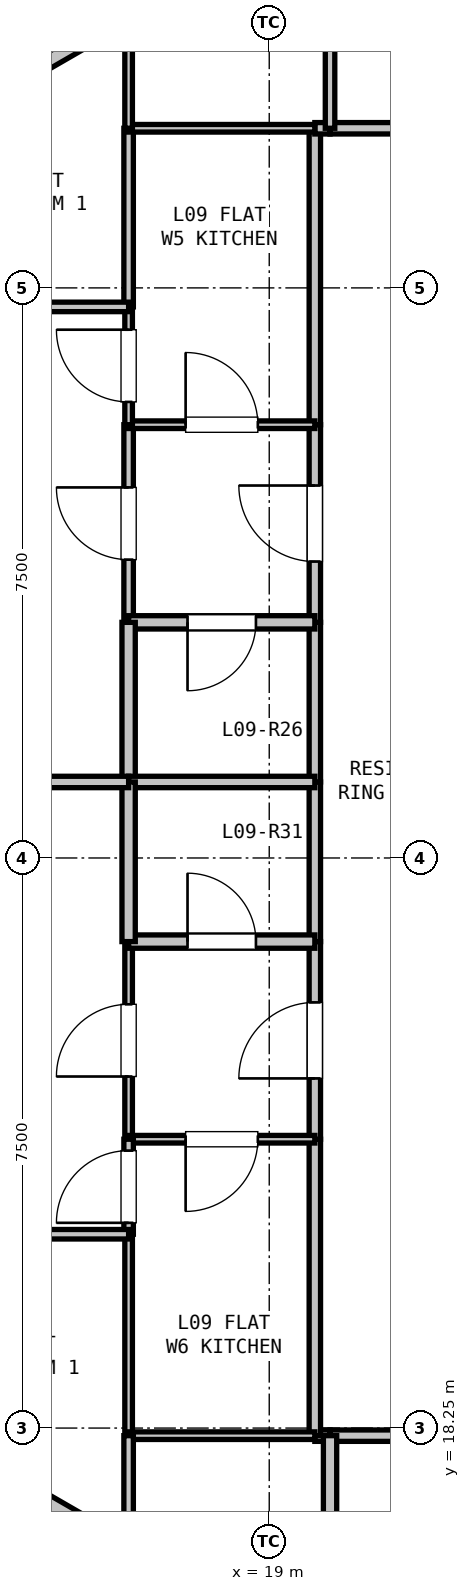
"""IFC4 building model, lengths in metres.
Left out: names, types, materials, properties, quantities, classifications, styles, units other than length and angle.
Written with IfcOpenShell. Run it as: python <this file> out.ifc"""

import sys

from ifc_helpers import new_model, si_unit, direction, frame, frame_2d, origin, place, context, subcontext, project, spatial, rectangle, extrude, element, fill, save


model = new_model("IFC4")
c1 = context("Model", 3, precision=1e-05, world=origin(), true_north=direction((0.0, 1.0)))
c2 = subcontext(c1, "Body", "Model", "MODEL_VIEW")
j1 = project(units=[si_unit("LENGTHUNIT", "METRE"), si_unit("PLANEANGLEUNIT", "RADIAN")], contexts=[c1])
p1 = place(None, origin())
s1 = spatial("IfcSite", under=j1, at=p1, CompositionType="ELEMENT")
p2 = place(p1, origin())
s2 = spatial("IfcBuilding", under=s1, at=p2, CompositionType="ELEMENT")
p3 = place(p2, frame((0.0, 0.0, 35.7)))
s3 = spatial("IfcBuildingStorey", under=s2, at=p3, CompositionType="ELEMENT", Elevation=35.7)
for number, where, z_axis, x_axis in (
    (1, (15.008, 35.611, 0.0), (0.0, 0.0, 1.0), (0.866, 0.5, 0.0)),
    (2, (16.48, 17.039, 0.0), (0.0, 0.0, 1.0), (-0.866, 0.5, 0.0)),
):
    element("IfcWall", number, at=place(p3, frame(where, z_axis=z_axis, x_axis=x_axis)), inside=s3, PredefinedType="PARAPET", context=c2, shape_type="SweptSolid", body=[
        extrude(rectangle(XDim=1.7, YDim=0.2, at=frame_2d((0.85, 0.0))), origin(), (0.0, 0.0, 1.0), 2.66),
    ])
p4 = place(p3, frame((21.8, 18.15, 0.0), z_axis=(0.0, 0.0, 1.0), x_axis=(-1.0, 0.0, 0.0)))
e3 = element("IfcWall", 3, at=p4, inside=s3, PredefinedType="PARTITIONING", context=c2, shape_type="SweptSolid", body=[
    extrude(rectangle(XDim=2.0, YDim=0.15, at=frame_2d((1.0, 0.0))), origin(), (0.0, 0.0, 1.0), 3.04),
])
p5 = place(p3, frame((19.8, 18.15, 0.0), z_axis=(0.0, 0.0, 1.0), x_axis=(-1.0, 0.0, 0.0)))
e4 = element("IfcWall", 4, at=p5, inside=s3, PredefinedType="PARTITIONING", context=c2, shape_type="SweptSolid", body=[
    extrude(rectangle(XDim=0.2, YDim=0.15, at=frame_2d((0.1, 0.0))), origin(), (0.0, 0.0, 1.0), 3.04),
])
p6 = place(p3, frame((19.6, 18.15, 0.0), z_axis=(0.0, 0.0, 1.0), x_axis=(0.0, 1.0, 0.0)))
e5 = element("IfcWall", 5, at=p6, inside=s3, PredefinedType="PARTITIONING", context=c2, shape_type="SweptSolid", body=[
    extrude(rectangle(XDim=3.9, YDim=0.15, at=frame_2d((1.95, 0.0))), origin(), (0.0, 0.0, 1.0), 2.338),
])
p7 = place(p3, frame((19.6, 22.05, 0.0), z_axis=(0.0, 0.0, 1.0), x_axis=(0.0, 1.0, 0.0)))
e6 = element("IfcWall", 6, at=p7, inside=s3, PredefinedType="PARTITIONING", context=c2, shape_type="SweptSolid", body=[
    extrude(rectangle(XDim=2.6, YDim=0.15, at=frame_2d((1.3, 0.0))), origin(), (0.0, 0.0, 1.0), 3.04),
])
p8 = place(p7, frame((0.8, 0.0, 0.0)))
e7 = element("IfcOpeningElement", 7, at=p8, cuts=e6, PredefinedType="OPENING", context=c2, shape_type="SweptSolid", body=[
    extrude(rectangle(XDim=1.0, YDim=2.15, at=frame_2d((0.5, 1.075))), frame((0.0, 0.085, 0.0), z_axis=(0.0, -1.0, 0.0), x_axis=(1.0, 0.0, 0.0)), (0.0, 0.0, 1.0), 0.17),
])
for number, where, z_axis, x_axis in (
    (8, (19.6, 24.65, 0.0), (0.0, 0.0, 1.0), (0.0, 1.0, 0.0)),
    (9, (19.6, 26.75, 0.0), (0.0, 0.0, 1.0), (0.0, 1.0, 0.0)),
):
    element("IfcWall", number, at=place(p3, frame(where, z_axis=z_axis, x_axis=x_axis)), inside=s3, PredefinedType="PARTITIONING", context=c2, shape_type="SweptSolid", body=[
        extrude(rectangle(XDim=2.1, YDim=0.15, at=frame_2d((1.05, 0.0))), origin(), (0.0, 0.0, 1.0), 3.04),
    ])
p9 = place(p3, frame((19.6, 28.85, 0.0), z_axis=(0.0, 0.0, 1.0), x_axis=(0.0, 1.0, 0.0)))
e10 = element("IfcWall", 10, at=p9, inside=s3, PredefinedType="PARTITIONING", context=c2, shape_type="SweptSolid", body=[
    extrude(rectangle(XDim=2.6, YDim=0.15, at=frame_2d((1.3, 0.0))), origin(), (0.0, 0.0, 1.0), 3.04),
])
p10 = place(p9, frame((0.8, 0.0, 0.0)))
e11 = element("IfcOpeningElement", 11, at=p10, cuts=e10, PredefinedType="OPENING", context=c2, shape_type="SweptSolid", body=[
    extrude(rectangle(XDim=1.0, YDim=2.15, at=frame_2d((0.5, 1.075))), frame((0.0, 0.085, 0.0), z_axis=(0.0, -1.0, 0.0), x_axis=(1.0, 0.0, 0.0)), (0.0, 0.0, 1.0), 0.17),
])
p11 = place(p3, frame((19.6, 31.45, 0.0), z_axis=(0.0, 0.0, 1.0), x_axis=(0.0, 1.0, 0.0)))
e12 = element("IfcWall", 12, at=p11, inside=s3, PredefinedType="PARTITIONING", context=c2, shape_type="SweptSolid", body=[
    extrude(rectangle(XDim=3.9, YDim=0.15, at=frame_2d((1.95, 0.0))), origin(), (0.0, 0.0, 1.0), 2.338),
])
p12 = place(p3, frame((19.6, 35.35, 0.0), z_axis=(0.0, 0.0, 1.0), x_axis=(1.0, 0.0, 0.0)))
e13 = element("IfcWall", 13, at=p12, inside=s3, PredefinedType="PARTITIONING", context=c2, shape_type="SweptSolid", body=[
    extrude(rectangle(XDim=0.2, YDim=0.15, at=frame_2d((0.1, 0.0))), origin(), (0.0, 0.0, 1.0), 3.04),
])
p13 = place(p3, frame((19.8, 35.35, 0.0), z_axis=(0.0, 0.0, 1.0), x_axis=(1.0, 0.0, 0.0)))
e14 = element("IfcWall", 14, at=p13, inside=s3, PredefinedType="PARTITIONING", context=c2, shape_type="SweptSolid", body=[
    extrude(rectangle(XDim=3.0, YDim=0.15, at=frame_2d((1.5, 0.0))), origin(), (0.0, 0.0, 1.0), 3.04),
])
p14 = place(p3, frame((17.15, 28.85, 0.0), z_axis=(0.0, 0.0, 1.0), x_axis=(0.0, 1.0, 0.0)))
e15 = element("IfcWall", 15, at=p14, inside=s3, PredefinedType="PARTITIONING", context=c2, shape_type="SweptSolid", body=[
    extrude(rectangle(XDim=2.6, YDim=0.125, at=frame_2d((1.3, 0.0))), origin(), (0.0, 0.0, 1.0), 3.04),
])
p15 = place(p14, frame((0.825, 0.0, 0.0)))
e16 = element("IfcOpeningElement", 16, at=p15, cuts=e15, PredefinedType="OPENING", context=c2, shape_type="SweptSolid", body=[
    extrude(rectangle(XDim=0.95, YDim=2.1, at=frame_2d((0.475, 1.05))), frame((0.0, 0.073, 0.0), z_axis=(0.0, -1.0, 0.0), x_axis=(1.0, 0.0, 0.0)), (0.0, 0.0, 1.0), 0.145),
])
p16 = place(p3, frame((17.15, 31.45, 0.0), z_axis=(0.0, 0.0, 1.0), x_axis=(1.0, 0.0, 0.0)))
e17 = element("IfcWall", 17, at=p16, inside=s3, PredefinedType="PARTITIONING", context=c2, shape_type="SweptSolid", body=[
    extrude(rectangle(XDim=2.45, YDim=0.1, at=frame_2d((1.225, 0.0))), origin(), (0.0, 0.0, 1.0), 3.04),
])
p17 = place(p16, frame((0.75, 0.0, 0.0)))
e18 = element("IfcOpeningElement", 18, at=p17, cuts=e17, PredefinedType="OPENING", context=c2, shape_type="SweptSolid", body=[
    extrude(rectangle(XDim=0.95, YDim=2.1, at=frame_2d((0.475, 1.05))), frame((0.0, 0.06, 0.0), z_axis=(0.0, -1.0, 0.0), x_axis=(1.0, 0.0, 0.0)), (0.0, 0.0, 1.0), 0.12),
])
p18 = place(p3, frame((19.6, 28.85, 0.0), z_axis=(0.0, 0.0, 1.0), x_axis=(-1.0, 0.0, 0.0)))
e19 = element("IfcWall", 19, at=p18, inside=s3, PredefinedType="PLUMBINGWALL", context=c2, shape_type="SweptSolid", body=[
    extrude(rectangle(XDim=2.45, YDim=0.175, at=frame_2d((1.225, 0.0))), origin(), (0.0, 0.0, 1.0), 3.04),
])
p19 = place(p18, frame((0.775, 0.0, 0.0)))
e20 = element("IfcOpeningElement", 20, at=p19, cuts=e19, PredefinedType="OPENING", context=c2, shape_type="SweptSolid", body=[
    extrude(rectangle(XDim=0.9, YDim=2.1, at=frame_2d((0.45, 1.05))), frame((0.0, 0.097, 0.0), z_axis=(0.0, -1.0, 0.0), x_axis=(1.0, 0.0, 0.0)), (0.0, 0.0, 1.0), 0.195),
])
p20 = place(p3, frame((17.15, 22.05, 0.0), z_axis=(0.0, 0.0, 1.0), x_axis=(0.0, 1.0, 0.0)))
e21 = element("IfcWall", 21, at=p20, inside=s3, PredefinedType="PARTITIONING", context=c2, shape_type="SweptSolid", body=[
    extrude(rectangle(XDim=2.6, YDim=0.1, at=frame_2d((1.3, 0.0))), origin(), (0.0, 0.0, 1.0), 3.04),
])
p21 = place(p20, frame((0.825, 0.0, 0.0)))
e22 = element("IfcOpeningElement", 22, at=p21, cuts=e21, PredefinedType="OPENING", context=c2, shape_type="SweptSolid", body=[
    extrude(rectangle(XDim=0.95, YDim=2.1, at=frame_2d((0.475, 1.05))), frame((0.0, 0.06, 0.0), z_axis=(0.0, -1.0, 0.0), x_axis=(1.0, 0.0, 0.0)), (0.0, 0.0, 1.0), 0.12),
])
p22 = place(p3, frame((17.15, 24.65, 0.0), z_axis=(0.0, 0.0, 1.0), x_axis=(1.0, 0.0, 0.0)))
e23 = element("IfcWall", 23, at=p22, inside=s3, PredefinedType="PLUMBINGWALL", context=c2, shape_type="SweptSolid", body=[
    extrude(rectangle(XDim=2.45, YDim=0.175, at=frame_2d((1.225, 0.0))), origin(), (0.0, 0.0, 1.0), 3.04),
])
p23 = place(p22, frame((0.775, 0.0, 0.0)))
e24 = element("IfcOpeningElement", 24, at=p23, cuts=e23, PredefinedType="OPENING", context=c2, shape_type="SweptSolid", body=[
    extrude(rectangle(XDim=0.9, YDim=2.1, at=frame_2d((0.45, 1.05))), frame((0.0, 0.097, 0.0), z_axis=(0.0, -1.0, 0.0), x_axis=(1.0, 0.0, 0.0)), (0.0, 0.0, 1.0), 0.195),
])
p24 = place(p3, frame((19.6, 22.05, 0.0), z_axis=(0.0, 0.0, 1.0), x_axis=(-1.0, 0.0, 0.0)))
e25 = element("IfcWall", 25, at=p24, inside=s3, PredefinedType="PARTITIONING", context=c2, shape_type="SweptSolid", body=[
    extrude(rectangle(XDim=2.45, YDim=0.1, at=frame_2d((1.225, 0.0))), origin(), (0.0, 0.0, 1.0), 3.04),
])
p25 = place(p24, frame((0.75, 0.0, 0.0)))
e26 = element("IfcOpeningElement", 26, at=p25, cuts=e25, PredefinedType="OPENING", context=c2, shape_type="SweptSolid", body=[
    extrude(rectangle(XDim=0.95, YDim=2.1, at=frame_2d((0.475, 1.05))), frame((0.0, 0.06, 0.0), z_axis=(0.0, -1.0, 0.0), x_axis=(1.0, 0.0, 0.0)), (0.0, 0.0, 1.0), 0.12),
])
p26 = place(p3, frame((19.8, 35.35, 0.0), z_axis=(0.0, 0.0, 1.0), x_axis=(0.0, 1.0, 0.0)))
e27 = element("IfcWall", 27, at=p26, inside=s3, PredefinedType="PARTITIONING", context=c2, shape_type="SweptSolid", body=[
    extrude(rectangle(XDim=3.194, YDim=0.125, at=frame_2d((1.597, 0.0))), origin(), (0.0, 0.0, 1.0), 2.365),
])
p27 = place(p3, frame((19.8, 14.956, 0.0), z_axis=(0.0, 0.0, 1.0), x_axis=(0.0, 1.0, 0.0)))
e28 = element("IfcWall", 28, at=p27, inside=s3, PredefinedType="PLUMBINGWALL", context=c2, shape_type="SweptSolid", body=[
    extrude(rectangle(XDim=3.194, YDim=0.175, at=frame_2d((1.597, 0.0))), origin(), (0.0, 0.0, 1.0), 2.365),
])
p28 = place(p3, frame((17.15, 26.75, 0.0), z_axis=(0.0, 0.0, 1.0), x_axis=(0.0, 1.0, 0.0)))
e29 = element("IfcWall", 29, at=p28, inside=s3, PredefinedType="PLUMBINGWALL", context=c2, shape_type="SweptSolid", body=[
    extrude(rectangle(XDim=2.1, YDim=0.175, at=frame_2d((1.05, 0.0))), origin(), (0.0, 0.0, 1.0), 3.04),
])
p29 = place(p3, frame((19.6, 26.75, 0.0), z_axis=(0.0, 0.0, 1.0), x_axis=(-1.0, 0.0, 0.0)))
e30 = element("IfcWall", 30, at=p29, inside=s3, PredefinedType="PARTITIONING", context=c2, shape_type="SweptSolid", body=[
    extrude(rectangle(XDim=2.45, YDim=0.15, at=frame_2d((1.225, 0.0))), origin(), (0.0, 0.0, 1.0), 3.04),
])
p30 = place(p3, frame((17.15, 31.45, 0.0), z_axis=(0.0, 0.0, 1.0), x_axis=(0.0, 1.0, 0.0)))
e31 = element("IfcWall", 31, at=p30, inside=s3, PredefinedType="PARTITIONING", context=c2, shape_type="SweptSolid", body=[
    extrude(rectangle(XDim=1.55, YDim=0.1, at=frame_2d((0.775, 0.0))), origin(), (0.0, 0.0, 1.0), 2.338),
])
p31 = place(p30, frame((0.3, 0.0, 0.0)))
e32 = element("IfcOpeningElement", 32, at=p31, cuts=e31, PredefinedType="OPENING", context=c2, shape_type="SweptSolid", body=[
    extrude(rectangle(XDim=0.95, YDim=2.1, at=frame_2d((0.475, 1.05))), frame((0.0, 0.06, 0.0), z_axis=(0.0, -1.0, 0.0), x_axis=(1.0, 0.0, 0.0)), (0.0, 0.0, 1.0), 0.12),
])
p32 = place(p3, frame((17.15, 33.0, 0.0), z_axis=(0.0, 0.0, 1.0), x_axis=(0.0, 1.0, 0.0)))
e33 = element("IfcWall", 33, at=p32, inside=s3, PredefinedType="PARTITIONING", context=c2, shape_type="SweptSolid", body=[
    extrude(rectangle(XDim=2.35, YDim=0.125, at=frame_2d((1.175, 0.0))), origin(), (0.0, 0.0, 1.0), 3.04),
])
p33 = place(p3, frame((17.15, 35.35, 0.0), z_axis=(0.0, 0.0, 1.0), x_axis=(1.0, 0.0, 0.0)))
e34 = element("IfcWall", 34, at=p33, inside=s3, PredefinedType="PARTITIONING", context=c2, shape_type="SweptSolid", body=[
    extrude(rectangle(XDim=2.45, YDim=0.1, at=frame_2d((1.225, 0.0))), origin(), (0.0, 0.0, 1.0), 3.04),
])
p34 = place(p3, frame((17.15, 24.65, 0.0), z_axis=(0.0, 0.0, 1.0), x_axis=(0.0, 1.0, 0.0)))
e35 = element("IfcWall", 35, at=p34, inside=s3, PredefinedType="PLUMBINGWALL", context=c2, shape_type="SweptSolid", body=[
    extrude(rectangle(XDim=2.1, YDim=0.175, at=frame_2d((1.05, 0.0))), origin(), (0.0, 0.0, 1.0), 3.04),
])
p35 = place(p3, frame((17.15, 18.15, 0.0), z_axis=(0.0, 0.0, 1.0), x_axis=(0.0, 1.0, 0.0)))
e36 = element("IfcWall", 36, at=p35, inside=s3, PredefinedType="PARTITIONING", context=c2, shape_type="SweptSolid", body=[
    extrude(rectangle(XDim=2.65, YDim=0.1, at=frame_2d((1.325, 0.0))), origin(), (0.0, 0.0, 1.0), 3.04),
])
p36 = place(p3, frame((17.15, 20.8, 0.0), z_axis=(0.0, 0.0, 1.0), x_axis=(0.0, 1.0, 0.0)))
e37 = element("IfcWall", 37, at=p36, inside=s3, PredefinedType="PARTITIONING", context=c2, shape_type="SweptSolid", body=[
    extrude(rectangle(XDim=1.25, YDim=0.125, at=frame_2d((0.625, 0.0))), origin(), (0.0, 0.0, 1.0), 2.338),
])
p37 = place(p36, frame((0.15, 0.0, 0.0)))
e38 = element("IfcOpeningElement", 38, at=p37, cuts=e37, PredefinedType="OPENING", context=c2, shape_type="SweptSolid", body=[
    extrude(rectangle(XDim=0.95, YDim=2.1, at=frame_2d((0.475, 1.05))), frame((0.0, 0.073, 0.0), z_axis=(0.0, -1.0, 0.0), x_axis=(1.0, 0.0, 0.0)), (0.0, 0.0, 1.0), 0.145),
])
p38 = place(p3, frame((19.6, 18.15, 0.0), z_axis=(0.0, 0.0, 1.0), x_axis=(-1.0, 0.0, 0.0)))
e39 = element("IfcWall", 39, at=p38, inside=s3, PredefinedType="PARTITIONING", context=c2, shape_type="SweptSolid", body=[
    extrude(rectangle(XDim=2.45, YDim=0.1, at=frame_2d((1.225, 0.0))), origin(), (0.0, 0.0, 1.0), 3.04),
])
p39 = place(p3, frame((10.419, 33.0, 0.0), z_axis=(0.0, 0.0, 1.0), x_axis=(1.0, 0.0, 0.0)))
e40 = element("IfcWall", 40, at=p39, inside=s3, PredefinedType="PARTITIONING", context=c2, shape_type="SweptSolid", body=[
    extrude(rectangle(XDim=6.731, YDim=0.125, at=frame_2d((3.365, 0.0))), origin(), (0.0, 0.0, 1.0), 2.365),
])
p40 = place(p39, frame((2.89, 0.0, 0.0)))
e41 = element("IfcOpeningElement", 41, at=p40, cuts=e40, PredefinedType="OPENING", context=c2, shape_type="SweptSolid", body=[
    extrude(rectangle(XDim=0.95, YDim=2.1, at=frame_2d((0.475, 1.05))), frame((0.0, 0.073, 0.0), z_axis=(0.0, -1.0, 0.0), x_axis=(1.0, 0.0, 0.0)), (0.0, 0.0, 1.0), 0.145),
])
p41 = place(p3, frame((17.15, 26.75, 0.0), z_axis=(0.0, 0.0, 1.0), x_axis=(-1.0, 0.0, 0.0)))
e42 = element("IfcWall", 42, at=p41, inside=s3, PredefinedType="PARTITIONING", context=c2, shape_type="SweptSolid", body=[
    extrude(rectangle(XDim=13.175, YDim=0.15, at=frame_2d((6.588, 0.0))), origin(), (0.0, 0.0, 1.0), 2.65),
])
p42 = place(p3, frame((17.15, 37.014, 0.0), z_axis=(0.0, 0.0, 1.0), x_axis=(0.0, -1.0, 0.0)))
e43 = element("IfcWall", 43, at=p42, inside=s3, PredefinedType="PARTITIONING", context=c2, shape_type="SweptSolid", body=[
    extrude(rectangle(XDim=1.664, YDim=0.1, at=frame_2d((0.832, 0.0))), origin(), (0.0, 0.0, 1.0), 2.365),
])
p43 = place(p3, frame((17.15, 20.8, 0.0), z_axis=(0.0, 0.0, 1.0), x_axis=(-1.0, 0.0, 0.0)))
e44 = element("IfcWall", 44, at=p43, inside=s3, PredefinedType="PARTITIONING", context=c2, shape_type="SweptSolid", body=[
    extrude(rectangle(XDim=7.25, YDim=0.125, at=frame_2d((3.625, 0.0))), origin(), (0.0, 0.0, 1.0), 2.365),
])
p44 = place(p43, frame((3.15, 0.0, 0.0)))
e45 = element("IfcOpeningElement", 45, at=p44, cuts=e44, PredefinedType="OPENING", context=c2, shape_type="SweptSolid", body=[
    extrude(rectangle(XDim=0.95, YDim=2.1, at=frame_2d((0.475, 1.05))), frame((0.0, 0.073, 0.0), z_axis=(0.0, -1.0, 0.0), x_axis=(1.0, 0.0, 0.0)), (0.0, 0.0, 1.0), 0.145),
])
p45 = place(p3, frame((17.15, 18.15, 0.0), z_axis=(0.0, 0.0, 1.0), x_axis=(0.0, -1.0, 0.0)))
e46 = element("IfcWall", 46, at=p45, inside=s3, PredefinedType="PARTITIONING", context=c2, shape_type="SweptSolid", body=[
    extrude(rectangle(XDim=1.664, YDim=0.125, at=frame_2d((0.832, 0.0))), origin(), (0.0, 0.0, 1.0), 2.365),
])
p46 = place(p10, origin())
e47 = element("IfcDoor", 47, at=p46, inside=s3, OperationType="SINGLE_SWING_RIGHT", PredefinedType="DOOR", context=c2, shape_type="SweptSolid", body=[
    extrude(rectangle(XDim=1.0, YDim=2.15, at=frame_2d((0.5, 1.075))), frame((0.0, 0.025, 0.0), z_axis=(0.0, -1.0, 0.0), x_axis=(1.0, 0.0, 0.0)), (0.0, 0.0, 1.0), 0.05),
])
fill(e11, e47)
p47 = place(p8, origin())
e48 = element("IfcDoor", 48, at=p47, inside=s3, OperationType="SINGLE_SWING_LEFT", PredefinedType="DOOR", context=c2, shape_type="SweptSolid", body=[
    extrude(rectangle(XDim=1.0, YDim=2.15, at=frame_2d((0.5, 1.075))), frame((0.0, 0.025, 0.0), z_axis=(0.0, -1.0, 0.0), x_axis=(1.0, 0.0, 0.0)), (0.0, 0.0, 1.0), 0.05),
])
fill(e7, e48)
p48 = place(p19, origin())
e49 = element("IfcDoor", 49, at=p48, inside=s3, OperationType="SINGLE_SWING_RIGHT", PredefinedType="DOOR", context=c2, shape_type="SweptSolid", body=[
    extrude(rectangle(XDim=0.9, YDim=2.1, at=frame_2d((0.45, 1.05))), frame((0.0, 0.025, 0.0), z_axis=(0.0, -1.0, 0.0), x_axis=(1.0, 0.0, 0.0)), (0.0, 0.0, 1.0), 0.05),
])
fill(e20, e49)
p49 = place(p17, origin())
e50 = element("IfcDoor", 50, at=p49, inside=s3, OperationType="SINGLE_SWING_LEFT", PredefinedType="DOOR", context=c2, shape_type="SweptSolid", body=[
    extrude(rectangle(XDim=0.95, YDim=2.1, at=frame_2d((0.475, 1.05))), frame((0.0, 0.025, 0.0), z_axis=(0.0, -1.0, 0.0), x_axis=(1.0, 0.0, 0.0)), (0.0, 0.0, 1.0), 0.05),
])
fill(e18, e50)
p50 = place(p15, origin())
e51 = element("IfcDoor", 51, at=p50, inside=s3, OperationType="SINGLE_SWING_RIGHT", PredefinedType="DOOR", context=c2, shape_type="SweptSolid", body=[
    extrude(rectangle(XDim=0.95, YDim=2.1, at=frame_2d((0.475, 1.05))), frame((0.0, 0.025, 0.0), z_axis=(0.0, -1.0, 0.0), x_axis=(1.0, 0.0, 0.0)), (0.0, 0.0, 1.0), 0.05),
])
fill(e16, e51)
p51 = place(p23, origin())
e52 = element("IfcDoor", 52, at=p51, inside=s3, OperationType="SINGLE_SWING_LEFT", PredefinedType="DOOR", context=c2, shape_type="SweptSolid", body=[
    extrude(rectangle(XDim=0.9, YDim=2.1, at=frame_2d((0.45, 1.05))), frame((0.0, 0.025, 0.0), z_axis=(0.0, -1.0, 0.0), x_axis=(1.0, 0.0, 0.0)), (0.0, 0.0, 1.0), 0.05),
])
fill(e24, e52)
p52 = place(p25, origin())
e53 = element("IfcDoor", 53, at=p52, inside=s3, OperationType="SINGLE_SWING_RIGHT", PredefinedType="DOOR", context=c2, shape_type="SweptSolid", body=[
    extrude(rectangle(XDim=0.95, YDim=2.1, at=frame_2d((0.475, 1.05))), frame((0.0, 0.025, 0.0), z_axis=(0.0, -1.0, 0.0), x_axis=(1.0, 0.0, 0.0)), (0.0, 0.0, 1.0), 0.05),
])
fill(e26, e53)
p53 = place(p21, origin())
e54 = element("IfcDoor", 54, at=p53, inside=s3, OperationType="SINGLE_SWING_LEFT", PredefinedType="DOOR", context=c2, shape_type="SweptSolid", body=[
    extrude(rectangle(XDim=0.95, YDim=2.1, at=frame_2d((0.475, 1.05))), frame((0.0, 0.025, 0.0), z_axis=(0.0, -1.0, 0.0), x_axis=(1.0, 0.0, 0.0)), (0.0, 0.0, 1.0), 0.05),
])
fill(e22, e54)
p54 = place(p31, origin())
e55 = element("IfcDoor", 55, at=p54, inside=s3, OperationType="SINGLE_SWING_RIGHT", PredefinedType="DOOR", context=c2, shape_type="SweptSolid", body=[
    extrude(rectangle(XDim=0.95, YDim=2.1, at=frame_2d((0.475, 1.05))), frame((0.0, 0.025, 0.0), z_axis=(0.0, -1.0, 0.0), x_axis=(1.0, 0.0, 0.0)), (0.0, 0.0, 1.0), 0.05),
])
fill(e32, e55)
p55 = place(p37, origin())
e56 = element("IfcDoor", 56, at=p55, inside=s3, OperationType="SINGLE_SWING_LEFT", PredefinedType="DOOR", context=c2, shape_type="SweptSolid", body=[
    extrude(rectangle(XDim=0.95, YDim=2.1, at=frame_2d((0.475, 1.05))), frame((0.0, 0.025, 0.0), z_axis=(0.0, -1.0, 0.0), x_axis=(1.0, 0.0, 0.0)), (0.0, 0.0, 1.0), 0.05),
])
fill(e38, e56)
save(model, sys.argv[1])
